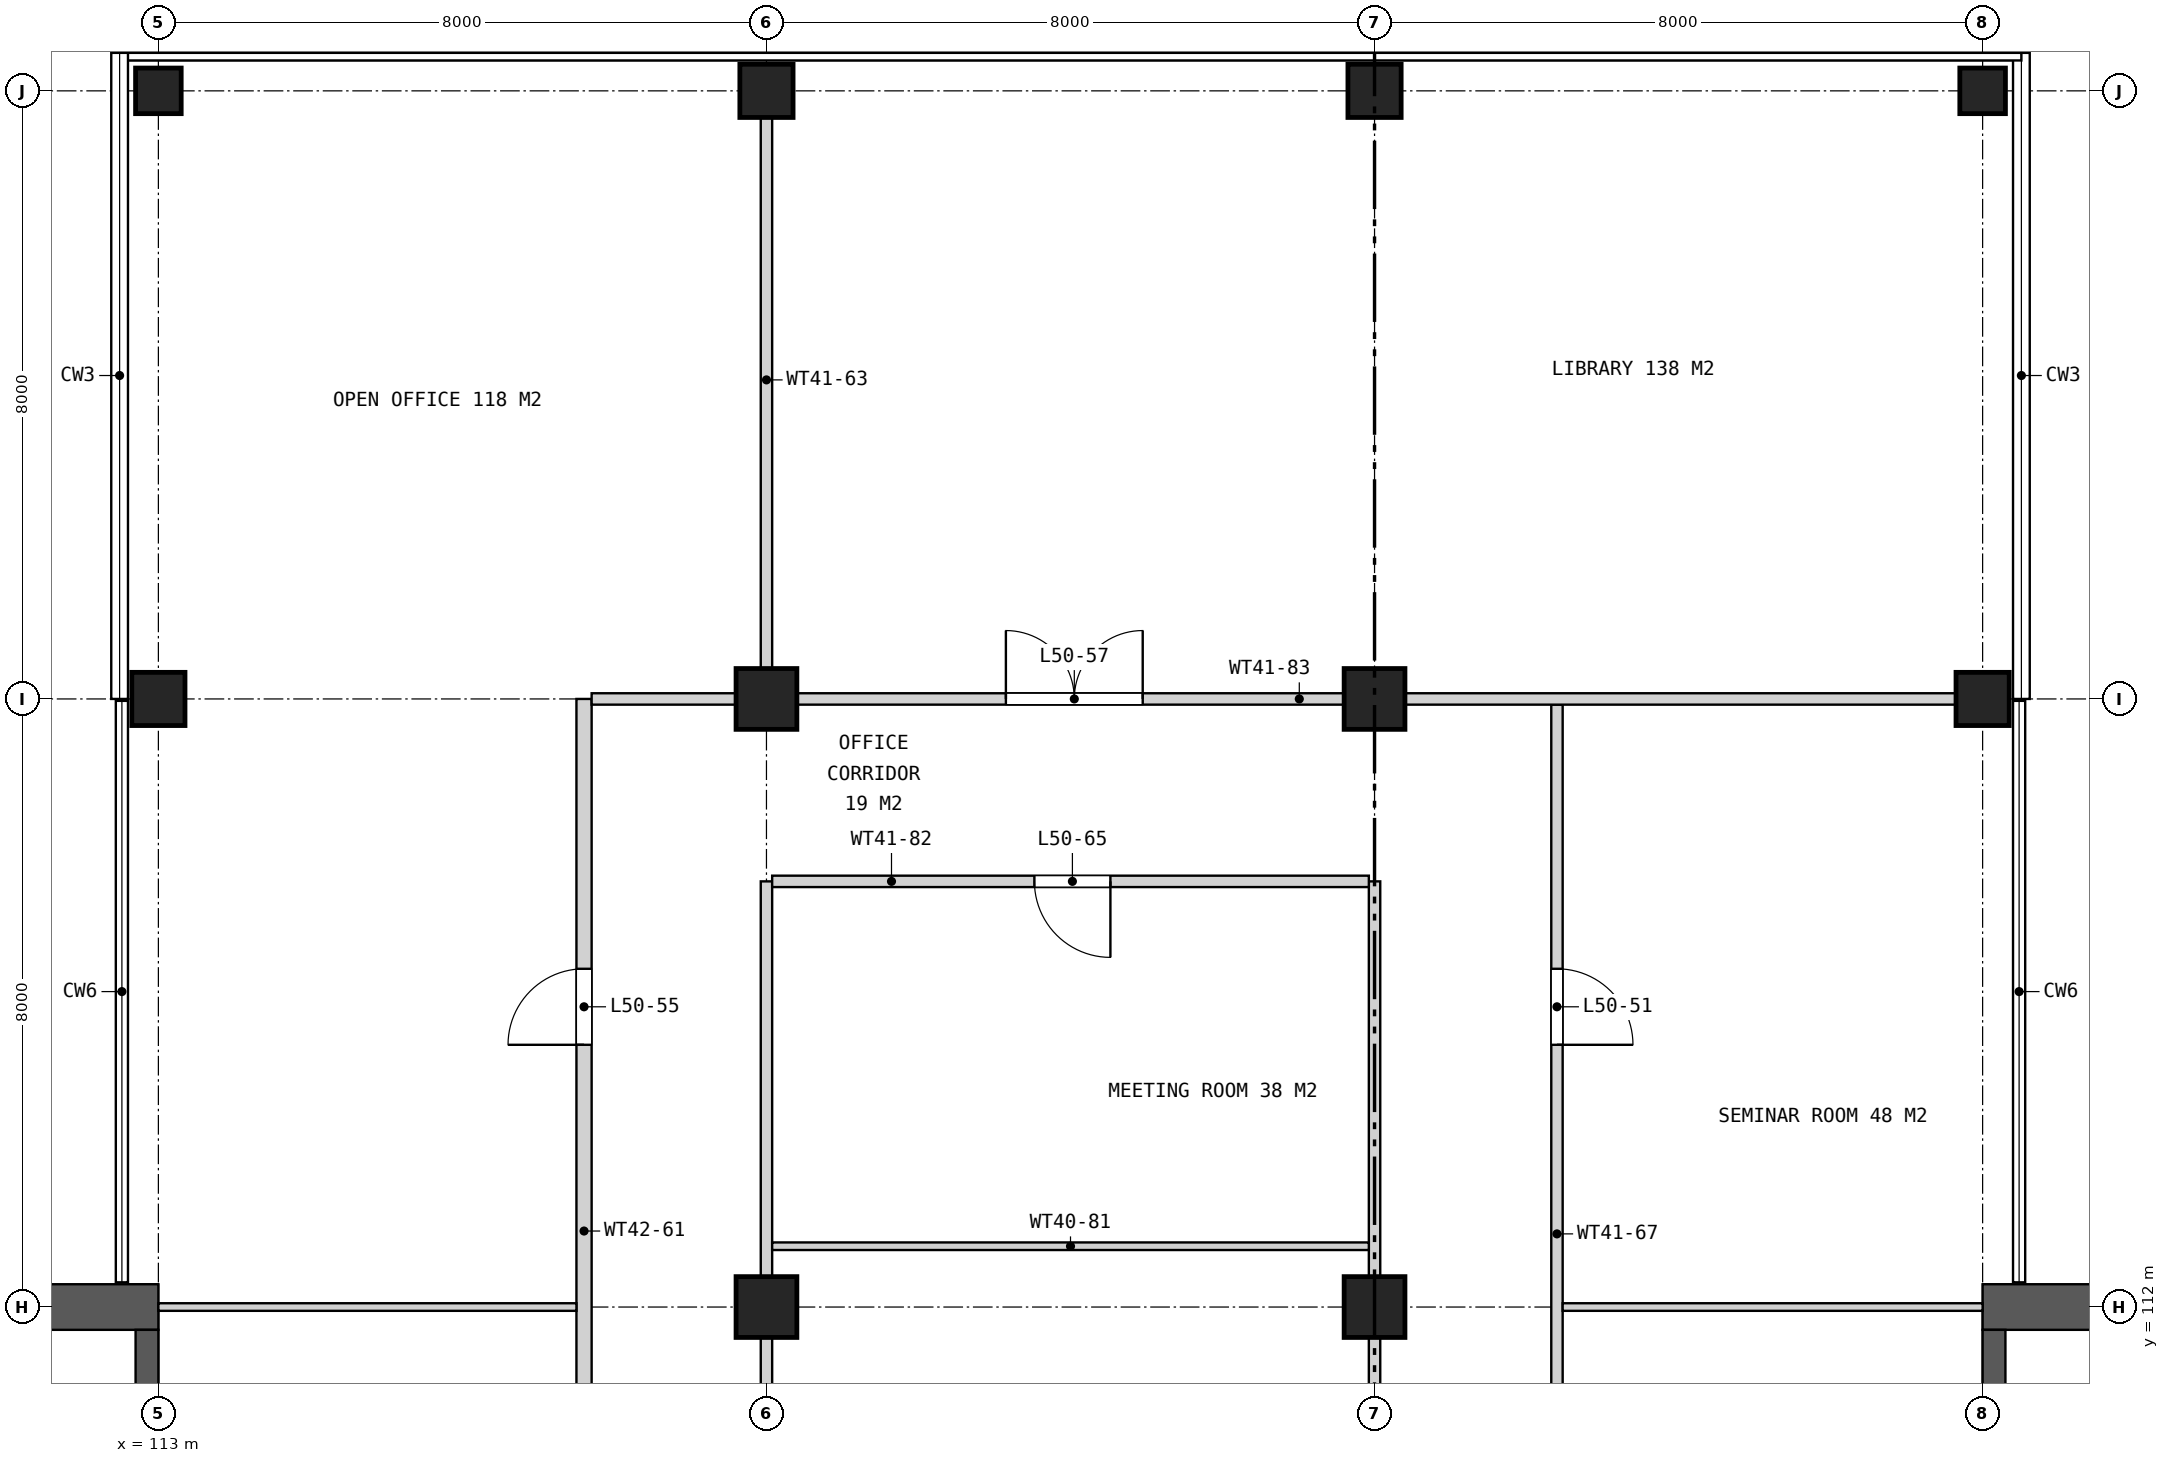
"""IFC4 building model, lengths in metres.
Left out: names, types, materials, properties, quantities, classifications, styles, units other than length and angle.
Written with IfcOpenShell. Run it as: python <this file> out.ifc"""

import sys

from ifc_helpers import new_model, si_unit, direction, frame, frame_2d, origin, origin_2d, place, context, subcontext, project, spatial, rectangle, extrude, element, fill, save


model = new_model("IFC4")
c1 = context("Model", 3, precision=1e-05, world=origin(), true_north=direction((0.0, 1.0)))
c2 = subcontext(c1, "Body", "Model", "MODEL_VIEW")
j1 = project(units=[si_unit("LENGTHUNIT", "METRE"), si_unit("PLANEANGLEUNIT", "RADIAN")], contexts=[c1])
p1 = place(None, origin())
s1 = spatial("IfcSite", under=j1, at=p1, CompositionType="ELEMENT")
p2 = place(p1, origin())
s2 = spatial("IfcBuilding", under=s1, at=p2, CompositionType="ELEMENT")
p3 = place(p2, frame((0.0, 0.0, 233.5)))
s3 = spatial("IfcBuildingStorey", under=s2, at=p3, CompositionType="ELEMENT", Elevation=233.5)
p4 = place(p3, frame((113.0, 120.0, 0.0), z_axis=(0.0, 0.0, 1.0), x_axis=(1.0, 0.0, 0.0)))
e1 = element("IfcColumn", 1, at=p4, inside=s3, PredefinedType="COLUMN", context=c2, shape_type="SweptSolid", body=[
    extrude(rectangle(XDim=0.7, YDim=0.7, at=origin_2d()), origin(), (0.0, 0.0, 1.0), 4.2),
])
p5 = place(p3, frame((113.0, 128.0, 0.0), z_axis=(0.0, 0.0, 1.0), x_axis=(1.0, 0.0, 0.0)))
e2 = element("IfcColumn", 2, at=p5, inside=s3, PredefinedType="COLUMN", context=c2, shape_type="SweptSolid", body=[
    extrude(rectangle(XDim=0.6, YDim=0.6, at=origin_2d()), origin(), (0.0, 0.0, 1.0), 4.2),
])
for number, where, z_axis, x_axis in (
    (3, (121.0, 112.0, 0.0), (0.0, 0.0, 1.0), (1.0, 0.0, 0.0)),
    (4, (121.0, 120.0, 0.0), (0.0, 0.0, 1.0), (1.0, 0.0, 0.0)),
):
    element("IfcColumn", number, at=place(p3, frame(where, z_axis=z_axis, x_axis=x_axis)), inside=s3, PredefinedType="COLUMN", context=c2, shape_type="SweptSolid", body=[
        extrude(rectangle(XDim=0.8, YDim=0.8, at=origin_2d()), origin(), (0.0, 0.0, 1.0), 4.2),
    ])
p6 = place(p3, frame((121.0, 128.0, 0.0), z_axis=(0.0, 0.0, 1.0), x_axis=(1.0, 0.0, 0.0)))
e5 = element("IfcColumn", 5, at=p6, inside=s3, PredefinedType="COLUMN", context=c2, shape_type="SweptSolid", body=[
    extrude(rectangle(XDim=0.7, YDim=0.7, at=origin_2d()), origin(), (0.0, 0.0, 1.0), 4.2),
])
for number, where, z_axis, x_axis in (
    (6, (129.0, 112.0, 0.0), (0.0, 0.0, 1.0), (1.0, 0.0, 0.0)),
    (7, (129.0, 120.0, 0.0), (0.0, 0.0, 1.0), (1.0, 0.0, 0.0)),
):
    element("IfcColumn", number, at=place(p3, frame(where, z_axis=z_axis, x_axis=x_axis)), inside=s3, PredefinedType="COLUMN", context=c2, shape_type="SweptSolid", body=[
        extrude(rectangle(XDim=0.8, YDim=0.8, at=origin_2d()), origin(), (0.0, 0.0, 1.0), 4.2),
    ])
for number, where, z_axis, x_axis in (
    (8, (129.0, 128.0, 0.0), (0.0, 0.0, 1.0), (1.0, 0.0, 0.0)),
    (9, (137.0, 120.0, 0.0), (0.0, 0.0, 1.0), (1.0, 0.0, 0.0)),
):
    element("IfcColumn", number, at=place(p3, frame(where, z_axis=z_axis, x_axis=x_axis)), inside=s3, PredefinedType="COLUMN", context=c2, shape_type="SweptSolid", body=[
        extrude(rectangle(XDim=0.7, YDim=0.7, at=origin_2d()), origin(), (0.0, 0.0, 1.0), 4.2),
    ])
p7 = place(p3, frame((137.0, 128.0, 0.0), z_axis=(0.0, 0.0, 1.0), x_axis=(1.0, 0.0, 0.0)))
e10 = element("IfcColumn", 10, at=p7, inside=s3, PredefinedType="COLUMN", context=c2, shape_type="SweptSolid", body=[
    extrude(rectangle(XDim=0.6, YDim=0.6, at=origin_2d()), origin(), (0.0, 0.0, 1.0), 4.2),
])
p8 = place(p3, frame((137.0, 112.0, 0.0), z_axis=(0.0, 0.0, 1.0), x_axis=(1.0, 0.0, 0.0)))
e11 = element("IfcWall", 11, at=p8, inside=s3, PredefinedType="SHEAR", context=c2, shape_type="SweptSolid", body=[
    extrude(rectangle(XDim=7.1, YDim=0.6, at=frame_2d((3.55, 0.0))), origin(), (0.0, 0.0, 1.0), 4.2),
])
p9 = place(p3, frame((137.15, 105.7, 0.0), z_axis=(0.0, 0.0, 1.0), x_axis=(0.0, 1.0, 0.0)))
e12 = element("IfcWall", 12, at=p9, inside=s3, PredefinedType="SHEAR", context=c2, shape_type="SweptSolid", body=[
    extrude(rectangle(XDim=6.0, YDim=0.3, at=frame_2d((3.0, 0.0))), origin(), (0.0, 0.0, 1.0), 4.2),
])
p10 = place(p3, frame((113.0, 112.0, 0.0), z_axis=(0.0, 0.0, 1.0), x_axis=(-1.0, 0.0, 0.0)))
e13 = element("IfcWall", 13, at=p10, inside=s3, PredefinedType="SHEAR", context=c2, shape_type="SweptSolid", body=[
    extrude(rectangle(XDim=7.1, YDim=0.6, at=frame_2d((3.55, 0.0))), origin(), (0.0, 0.0, 1.0), 4.2),
])
p11 = place(p3, frame((112.85, 111.7, 0.0), z_axis=(0.0, 0.0, 1.0), x_axis=(0.0, -1.0, 0.0)))
e14 = element("IfcWall", 14, at=p11, inside=s3, PredefinedType="SHEAR", context=c2, shape_type="SweptSolid", body=[
    extrude(rectangle(XDim=6.0, YDim=0.3, at=frame_2d((3.0, 0.0))), origin(), (0.0, 0.0, 1.0), 4.2),
])
p12 = place(p3, frame((118.6, 106.0, 0.0), z_axis=(0.0, 0.0, 1.0), x_axis=(0.0, 1.0, 0.0)))
e15 = element("IfcWall", 15, at=p12, inside=s3, PredefinedType="SOLIDWALL", context=c2, shape_type="SweptSolid", body=[
    extrude(rectangle(XDim=14.0, YDim=0.2, at=frame_2d((7.0, 0.0))), origin(), (0.0, 0.0, 1.0), 3.255),
])
p13 = place(p12, frame((0.95, 0.0, 0.0)))
e16 = element("IfcOpeningElement", 16, at=p13, cuts=e15, PredefinedType="OPENING", context=c2, shape_type="SweptSolid", body=[
    extrude(rectangle(XDim=1.0, YDim=2.1, at=frame_2d((0.5, 1.05))), frame((0.0, 0.11, 0.0), z_axis=(0.0, -1.0, 0.0), x_axis=(1.0, 0.0, 0.0)), (0.0, 0.0, 1.0), 0.22),
])
p14 = place(p12, frame((3.95, 0.0, 0.0)))
e17 = element("IfcOpeningElement", 17, at=p14, cuts=e15, PredefinedType="OPENING", context=c2, shape_type="SweptSolid", body=[
    extrude(rectangle(XDim=1.0, YDim=2.1, at=frame_2d((0.5, 1.05))), frame((0.0, 0.11, 0.0), z_axis=(0.0, -1.0, 0.0), x_axis=(1.0, 0.0, 0.0)), (0.0, 0.0, 1.0), 0.22),
])
p15 = place(p12, frame((9.45, 0.0, 0.0)))
e18 = element("IfcOpeningElement", 18, at=p15, cuts=e15, PredefinedType="OPENING", context=c2, shape_type="SweptSolid", body=[
    extrude(rectangle(XDim=1.0, YDim=2.1, at=frame_2d((0.5, 1.05))), frame((0.0, 0.11, 0.0), z_axis=(0.0, -1.0, 0.0), x_axis=(1.0, 0.0, 0.0)), (0.0, 0.0, 1.0), 0.22),
])
p16 = place(p3, frame((121.0, 82.4, 0.0), z_axis=(0.0, 0.0, 1.0), x_axis=(0.0, 1.0, 0.0)))
e19 = element("IfcWall", 19, at=p16, inside=s3, PredefinedType="PARTITIONING", context=c2, shape_type="SweptSolid", body=[
    extrude(rectangle(XDim=35.2, YDim=0.15, at=frame_2d((17.6, 0.0))), origin(), (0.0, 0.0, 1.0), 3.255),
])
p17 = place(p16, frame((9.45, 0.0, 0.0)))
e20 = element("IfcOpeningElement", 20, at=p17, cuts=e19, PredefinedType="OPENING", context=c2, shape_type="SweptSolid", body=[
    extrude(rectangle(XDim=1.0, YDim=2.1, at=frame_2d((0.5, 1.05))), frame((0.0, 0.085, 0.0), z_axis=(0.0, -1.0, 0.0), x_axis=(1.0, 0.0, 0.0)), (0.0, 0.0, 1.0), 0.17),
])
p18 = place(p16, frame((20.05, 0.0, 0.0)))
e21 = element("IfcOpeningElement", 21, at=p18, cuts=e19, PredefinedType="OPENING", context=c2, shape_type="SweptSolid", body=[
    extrude(rectangle(XDim=1.0, YDim=2.1, at=frame_2d((0.5, 1.05))), frame((0.0, 0.085, 0.0), z_axis=(0.0, -1.0, 0.0), x_axis=(1.0, 0.0, 0.0)), (0.0, 0.0, 1.0), 0.17),
])
p19 = place(p3, frame((121.0, 120.075, 0.0), z_axis=(0.0, 0.0, 1.0), x_axis=(0.0, 1.0, 0.0)))
e22 = element("IfcWall", 22, at=p19, inside=s3, PredefinedType="PARTITIONING", context=c2, shape_type="SweptSolid", body=[
    extrude(rectangle(XDim=8.245, YDim=0.15, at=frame_2d((4.123, 0.0))), origin(), (0.0, 0.0, 1.0), 3.255),
])
p20 = place(p3, frame((129.0, 82.4, 0.0), z_axis=(0.0, 0.0, 1.0), x_axis=(0.0, 1.0, 0.0)))
e23 = element("IfcWall", 23, at=p20, inside=s3, PredefinedType="PARTITIONING", context=c2, shape_type="SweptSolid", body=[
    extrude(rectangle(XDim=35.2, YDim=0.15, at=frame_2d((17.6, 0.0))), origin(), (0.0, 0.0, 1.0), 3.255),
])
p21 = place(p20, frame((15.45, 0.0, 0.0)))
e24 = element("IfcOpeningElement", 24, at=p21, cuts=e23, PredefinedType="OPENING", context=c2, shape_type="SweptSolid", body=[
    extrude(rectangle(XDim=1.0, YDim=2.1, at=frame_2d((0.5, 1.05))), frame((0.0, 0.085, 0.0), z_axis=(0.0, -1.0, 0.0), x_axis=(1.0, 0.0, 0.0)), (0.0, 0.0, 1.0), 0.17),
])
p22 = place(p20, frame((26.75, 0.0, 0.0)))
e25 = element("IfcOpeningElement", 25, at=p22, cuts=e23, PredefinedType="OPENING", context=c2, shape_type="SweptSolid", body=[
    extrude(rectangle(XDim=1.0, YDim=2.1, at=frame_2d((0.5, 1.05))), frame((0.0, 0.085, 0.0), z_axis=(0.0, -1.0, 0.0), x_axis=(1.0, 0.0, 0.0)), (0.0, 0.0, 1.0), 0.17),
])
p23 = place(p3, frame((131.4, 106.0, 0.0), z_axis=(0.0, 0.0, 1.0), x_axis=(0.0, 1.0, 0.0)))
e26 = element("IfcWall", 26, at=p23, inside=s3, PredefinedType="PARTITIONING", context=c2, shape_type="SweptSolid", body=[
    extrude(rectangle(XDim=13.925, YDim=0.15, at=frame_2d((6.962, 0.0))), origin(), (0.0, 0.0, 1.0), 3.255),
])
p24 = place(p23, frame((2.45, 0.0, 0.0)))
e27 = element("IfcOpeningElement", 27, at=p24, cuts=e26, PredefinedType="OPENING", context=c2, shape_type="SweptSolid", body=[
    extrude(rectangle(XDim=1.0, YDim=2.1, at=frame_2d((0.5, 1.05))), frame((0.0, 0.085, 0.0), z_axis=(0.0, -1.0, 0.0), x_axis=(1.0, 0.0, 0.0)), (0.0, 0.0, 1.0), 0.17),
])
p25 = place(p23, frame((9.45, 0.0, 0.0)))
e28 = element("IfcOpeningElement", 28, at=p25, cuts=e26, PredefinedType="OPENING", context=c2, shape_type="SweptSolid", body=[
    extrude(rectangle(XDim=1.0, YDim=2.1, at=frame_2d((0.5, 1.05))), frame((0.0, 0.085, 0.0), z_axis=(0.0, -1.0, 0.0), x_axis=(1.0, 0.0, 0.0)), (0.0, 0.0, 1.0), 0.17),
])
p26 = place(p3, frame((113.0, 112.0, 0.0), z_axis=(0.0, 0.0, 1.0), x_axis=(1.0, 0.0, 0.0)))
e29 = element("IfcWall", 29, at=p26, inside=s3, PredefinedType="PARTITIONING", context=c2, shape_type="SweptSolid", body=[
    extrude(rectangle(XDim=5.5, YDim=0.1, at=frame_2d((2.75, 0.0))), origin(), (0.0, 0.0, 1.0), 3.255),
])
p27 = place(p3, frame((131.475, 112.0, 0.0), z_axis=(0.0, 0.0, 1.0), x_axis=(1.0, 0.0, 0.0)))
e30 = element("IfcWall", 30, at=p27, inside=s3, PredefinedType="PARTITIONING", context=c2, shape_type="SweptSolid", body=[
    extrude(rectangle(XDim=5.525, YDim=0.1, at=frame_2d((2.762, 0.0))), origin(), (0.0, 0.0, 1.0), 3.255),
])
p28 = place(p3, frame((121.075, 112.8, 0.0), z_axis=(0.0, 0.0, 1.0), x_axis=(1.0, 0.0, 0.0)))
e31 = element("IfcWall", 31, at=p28, inside=s3, PredefinedType="PARTITIONING", context=c2, shape_type="SweptSolid", body=[
    extrude(rectangle(XDim=7.85, YDim=0.1, at=frame_2d((3.925, 0.0))), origin(), (0.0, 0.0, 1.0), 3.255),
])
p29 = place(p3, frame((121.075, 117.6, 0.0), z_axis=(0.0, 0.0, 1.0), x_axis=(1.0, 0.0, 0.0)))
e32 = element("IfcWall", 32, at=p29, inside=s3, PredefinedType="PARTITIONING", context=c2, shape_type="SweptSolid", body=[
    extrude(rectangle(XDim=7.85, YDim=0.15, at=frame_2d((3.925, 0.0))), origin(), (0.0, 0.0, 1.0), 3.255),
])
p30 = place(p29, frame((3.45, 0.0, 0.0)))
e33 = element("IfcOpeningElement", 33, at=p30, cuts=e32, PredefinedType="OPENING", context=c2, shape_type="SweptSolid", body=[
    extrude(rectangle(XDim=1.0, YDim=2.1, at=frame_2d((0.5, 1.05))), frame((0.0, 0.085, 0.0), z_axis=(0.0, -1.0, 0.0), x_axis=(1.0, 0.0, 0.0)), (0.0, 0.0, 1.0), 0.17),
])
p31 = place(p3, frame((118.7, 120.0, 0.0), z_axis=(0.0, 0.0, 1.0), x_axis=(1.0, 0.0, 0.0)))
e34 = element("IfcWall", 34, at=p31, inside=s3, PredefinedType="PARTITIONING", context=c2, shape_type="SweptSolid", body=[
    extrude(rectangle(XDim=18.62, YDim=0.15, at=frame_2d((9.31, 0.0))), origin(), (0.0, 0.0, 1.0), 3.255),
])
p32 = place(p31, frame((5.45, 0.0, 0.0)))
e35 = element("IfcOpeningElement", 35, at=p32, cuts=e34, PredefinedType="OPENING", context=c2, shape_type="SweptSolid", body=[
    extrude(rectangle(XDim=1.8, YDim=2.1, at=frame_2d((0.9, 1.05))), frame((0.0, 0.085, 0.0), z_axis=(0.0, -1.0, 0.0), x_axis=(1.0, 0.0, 0.0)), (0.0, 0.0, 1.0), 0.17),
])
p33 = place(p25, frame((1.0, 0.0, 0.0), z_axis=(0.0, 0.0, 1.0), x_axis=(-1.0, 0.0, 0.0)))
e36 = element("IfcDoor", 36, at=p33, inside=s3, OperationType="SINGLE_SWING_RIGHT", PredefinedType="DOOR", context=c2, shape_type="SweptSolid", body=[
    extrude(rectangle(XDim=1.0, YDim=2.1, at=frame_2d((0.5, 1.05))), frame((0.0, 0.025, 0.0), z_axis=(0.0, -1.0, 0.0), x_axis=(1.0, 0.0, 0.0)), (0.0, 0.0, 1.0), 0.05),
])
fill(e28, e36)
p34 = place(p15, origin())
e37 = element("IfcDoor", 37, at=p34, inside=s3, OperationType="SINGLE_SWING_LEFT", PredefinedType="DOOR", context=c2, shape_type="SweptSolid", body=[
    extrude(rectangle(XDim=1.0, YDim=2.1, at=frame_2d((0.5, 1.05))), frame((0.0, 0.025, 0.0), z_axis=(0.0, -1.0, 0.0), x_axis=(1.0, 0.0, 0.0)), (0.0, 0.0, 1.0), 0.05),
])
fill(e18, e37)
p35 = place(p32, origin())
e38 = element("IfcDoor", 38, at=p35, inside=s3, OperationType="DOUBLE_DOOR_SINGLE_SWING", PredefinedType="DOOR", context=c2, shape_type="SweptSolid", body=[
    extrude(rectangle(XDim=1.8, YDim=2.1, at=frame_2d((0.9, 1.05))), frame((0.0, 0.025, 0.0), z_axis=(0.0, -1.0, 0.0), x_axis=(1.0, 0.0, 0.0)), (0.0, 0.0, 1.0), 0.05),
])
fill(e35, e38)
p36 = place(p30, frame((1.0, 0.0, 0.0), z_axis=(0.0, 0.0, 1.0), x_axis=(-1.0, 0.0, 0.0)))
e39 = element("IfcDoor", 39, at=p36, inside=s3, OperationType="SINGLE_SWING_LEFT", PredefinedType="DOOR", context=c2, shape_type="SweptSolid", body=[
    extrude(rectangle(XDim=1.0, YDim=2.1, at=frame_2d((0.5, 1.05))), frame((0.0, 0.025, 0.0), z_axis=(0.0, -1.0, 0.0), x_axis=(1.0, 0.0, 0.0)), (0.0, 0.0, 1.0), 0.05),
])
fill(e33, e39)
save(model, sys.argv[1])
